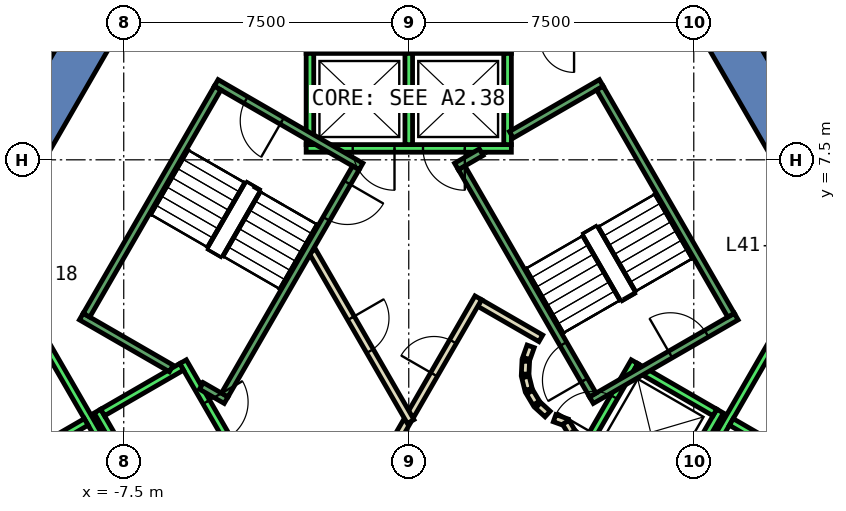
"""IFC4 building model, lengths in metres.
Left out: names, types, materials, properties, quantities, classifications, styles, units other than length and angle.
Written with IfcOpenShell. Run it as: python <this file> out.ifc"""

import sys

from ifc_helpers import new_model, si_unit, direction, frame, frame_2d, origin, place, context, subcontext, project, spatial, polyline, rectangle, outline, extrude, element, fill, save


model = new_model("IFC4")
c1 = context("Model", 3, precision=1e-05, world=origin(), true_north=direction((0.0, 1.0)))
c2 = subcontext(c1, "Body", "Model", "MODEL_VIEW")
j1 = project(units=[si_unit("LENGTHUNIT", "METRE"), si_unit("PLANEANGLEUNIT", "RADIAN")], contexts=[c1])
p1 = place(None, origin())
s1 = spatial("IfcSite", under=j1, at=p1, CompositionType="ELEMENT")
p2 = place(p1, origin())
s2 = spatial("IfcBuilding", under=s1, at=p2, CompositionType="ELEMENT")
p3 = place(p2, frame((0.0, 0.0, 184.4)))
s3 = spatial("IfcBuildingStorey", under=s2, at=p3, CompositionType="ELEMENT", Elevation=184.4)
p4 = place(p3, frame((0.0, 0.0, -0.6)))
e1 = element("IfcWall", 1, at=p4, inside=s3, PredefinedType="SHEAR", context=c2, shape_type="SweptSolid", body=[
    extrude(outline(polyline([(8.517, 11.747), (7.478, 11.147), (12.471, 2.5), (13.856, 2.5), (8.517, 11.747)])), origin(), (0.0, 0.0, 1.0), 5.4),
])
p5 = place(p3, frame((0.0, 0.0, -0.6)))
e2 = element("IfcWall", 2, at=p5, inside=s3, PredefinedType="SHEAR", context=c2, shape_type="SweptSolid", body=[
    extrude(outline(polyline([(-12.267, 5.252), (-11.228, 4.652), (-6.235, 13.3), (-6.928, 14.5), (-12.267, 5.252)])), origin(), (0.0, 0.0, 1.0), 5.4),
])
p6 = place(p3, frame((0.0, 0.0, -0.6)))
e3 = element("IfcWall", 3, at=p6, inside=s3, PredefinedType="SHEAR", context=c2, shape_type="SweptSolid", body=[
    extrude(outline(polyline([(6.928, -9.5), (13.856, 2.5), (12.471, 2.5), (6.235, -8.3), (6.928, -9.5)])), origin(), (0.0, 0.0, 1.0), 5.4),
])
p7 = place(p3, frame((-0.982, -1.0, 0.0), z_axis=(0.0, 0.0, 1.0), x_axis=(0.50024047865, 0.865886518847, 0.0)))
e4 = element("IfcWall", 4, at=p7, inside=s3, PredefinedType="PARTITIONING", context=c2, shape_type="SweptSolid", body=[
    extrude(rectangle(XDim=1.863, YDim=0.2, at=frame_2d((0.931, 0.0))), origin(), (0.0, 0.0, 1.0), 4.8),
])
p8 = place(p3, frame((1.866, 3.732, 0.0), z_axis=(0.0, 0.0, 1.0), x_axis=(0.866043361281, -0.499968895414, 0.0)))
e5 = element("IfcWall", 5, at=p8, inside=s3, PredefinedType="PARTITIONING", context=c2, shape_type="SweptSolid", body=[
    extrude(rectangle(XDim=1.858, YDim=0.2, at=frame_2d((0.929, 0.0))), origin(), (0.0, 0.0, 1.0), 4.8),
])
p9 = place(p3, frame((3.208, 2.592, 0.0), z_axis=(0.0, 0.0, 1.0), x_axis=(-0.337388820924, -0.941365382578, 0.0)))
e6 = element("IfcWall", 6, at=p9, inside=s3, PredefinedType="PARTITIONING", context=c2, shape_type="SweptSolid", body=[
    extrude(rectangle(XDim=0.338, YDim=0.2, at=frame_2d((0.169, 0.0))), origin(), (0.0, 0.0, 1.0), 4.8),
])
p10 = place(p3, frame((3.079, 2.199, 0.0), z_axis=(0.0, 0.0, 1.0), x_axis=(-0.047771483479, -0.998858290933, 0.0)))
e7 = element("IfcWall", 7, at=p10, inside=s3, PredefinedType="PARTITIONING", context=c2, shape_type="SweptSolid", body=[
    extrude(rectangle(XDim=0.337, YDim=0.2, at=frame_2d((0.169, 0.0))), origin(), (0.0, 0.0, 1.0), 4.8),
])
p11 = place(p3, frame((3.07, 1.786, 0.0), z_axis=(0.0, 0.0, 1.0), x_axis=(0.242705583207, -0.970099994784, 0.0)))
e8 = element("IfcWall", 8, at=p11, inside=s3, PredefinedType="PARTITIONING", context=c2, shape_type="SweptSolid", body=[
    extrude(rectangle(XDim=0.338, YDim=0.2, at=frame_2d((0.169, 0.0))), origin(), (0.0, 0.0, 1.0), 4.8),
])
for number, where, z_axis, x_axis in (
    (9, (3.182, 1.388, 0.0), (0.0, 0.0, 1.0), (0.512, -0.859, 0.0)),
    (10, (3.404, 1.039, 0.0), (0.0, 0.0, 1.0), (0.74, -0.672, 0.0)),
):
    element("IfcWall", number, at=place(p3, frame(where, z_axis=z_axis, x_axis=x_axis)), inside=s3, PredefinedType="PARTITIONING", context=c2, shape_type="SweptSolid", body=[
        extrude(rectangle(XDim=0.338, YDim=0.2, at=frame_2d((0.169, 0.0))), origin(), (0.0, 0.0, 1.0), 4.8),
    ])
p12 = place(p3, frame((3.838, 0.702, 0.0), z_axis=(0.0, 0.0, 1.0), x_axis=(0.941035081519, -0.338308993895, 0.0)))
e11 = element("IfcWall", 11, at=p12, inside=s3, PredefinedType="PARTITIONING", context=c2, shape_type="SweptSolid", body=[
    extrude(rectangle(XDim=0.337, YDim=0.2, at=frame_2d((0.168, 0.0))), origin(), (0.0, 0.0, 1.0), 4.8),
])
p13 = place(p3, frame((4.132, 0.593, 0.0), z_axis=(0.0, 0.0, 1.0), x_axis=(0.513561617048, -0.858052717201, 0.0)))
e12 = element("IfcWall", 12, at=p13, inside=s3, PredefinedType="PARTITIONING", context=c2, shape_type="SweptSolid", body=[
    extrude(rectangle(XDim=0.308, YDim=0.2, at=frame_2d((0.154, 0.0))), origin(), (0.0, 0.0, 1.0), 4.8),
])
p14 = place(p3, frame((4.301, 0.315, 0.0), z_axis=(0.0, 0.0, 1.0), x_axis=(0.741798017506, -0.670623367639, 0.0)))
e13 = element("IfcWall", 13, at=p14, inside=s3, PredefinedType="PARTITIONING", context=c2, shape_type="SweptSolid", body=[
    extrude(rectangle(XDim=0.309, YDim=0.2, at=frame_2d((0.154, 0.0))), origin(), (0.0, 0.0, 1.0), 4.8),
])
p15 = place(p3, frame((0.05, 0.787, 0.0), z_axis=(0.0, 0.0, 1.0), x_axis=(0.499954076797, 0.866051915934, 0.0)))
e14 = element("IfcWall", 14, at=p15, inside=s3, PredefinedType="PARTITIONING", context=c2, shape_type="SweptSolid", body=[
    extrude(rectangle(XDim=3.558, YDim=0.2, at=frame_2d((1.779, 0.0))), origin(), (0.0, 0.0, 1.0), 4.8),
])
p16 = place(p15, frame((1.229, 0.0, 0.0)))
e15 = element("IfcOpeningElement", 15, at=p16, cuts=e14, PredefinedType="OPENING", context=c2, shape_type="SweptSolid", body=[
    extrude(rectangle(XDim=1.0, YDim=2.1, at=frame_2d((0.5, 1.05))), frame((0.0, 0.11, 0.0), z_axis=(0.0, -1.0, 0.0), x_axis=(1.0, 0.0, 0.0)), (0.0, 0.0, 1.0), 0.22),
])
p17 = place(p3, frame((-2.54, 5.1, 0.0), z_axis=(0.0, 0.0, 1.0), x_axis=(0.499925051871, -0.866068670783, 0.0)))
e16 = element("IfcWall", 16, at=p17, inside=s3, PredefinedType="PARTITIONING", context=c2, shape_type="SweptSolid", body=[
    extrude(rectangle(XDim=5.181, YDim=0.2, at=frame_2d((2.59, 0.0))), origin(), (0.0, 0.0, 1.0), 4.8),
])
p18 = place(p17, frame((2.04, 0.0, 0.0)))
e17 = element("IfcOpeningElement", 17, at=p18, cuts=e16, PredefinedType="OPENING", context=c2, shape_type="SweptSolid", body=[
    extrude(rectangle(XDim=1.0, YDim=2.1, at=frame_2d((0.5, 1.05))), frame((0.0, 0.11, 0.0), z_axis=(0.0, -1.0, 0.0), x_axis=(1.0, 0.0, 0.0)), (0.0, 0.0, 1.0), 0.22),
])
p19 = place(p3, frame((-13.003, 8.778, 0.0), z_axis=(0.0, 0.0, 1.0), x_axis=(0.499964736285, 0.866045762343, 0.0)))
e18 = element("IfcWall", 18, at=p19, inside=s3, PredefinedType="PARTITIONING", context=c2, shape_type="SweptSolid", body=[
    extrude(rectangle(XDim=9.479, YDim=0.2, at=frame_2d((4.739, 0.0))), origin(), (0.0, 0.0, 1.0), 4.8),
])
p20 = place(p19, frame((7.862, 0.0, 0.0)))
e19 = element("IfcOpeningElement", 19, at=p20, cuts=e18, PredefinedType="OPENING", context=c2, shape_type="SweptSolid", body=[
    extrude(rectangle(XDim=1.0, YDim=2.1, at=frame_2d((0.5, 1.05))), frame((0.0, 0.11, 0.0), z_axis=(0.0, -1.0, 0.0), x_axis=(1.0, 0.0, 0.0)), (0.0, 0.0, 1.0), 0.22),
])
p21 = place(p3, frame((2.7, 7.8, 0.0), z_axis=(0.0, 0.0, 1.0), x_axis=(-1.0, 0.0, 0.0)))
e20 = element("IfcWall", 20, at=p21, inside=s3, PredefinedType="STANDARD", context=c2, shape_type="SweptSolid", body=[
    extrude(rectangle(XDim=5.4, YDim=0.2, at=frame_2d((2.7, 0.0))), origin(), (0.0, 0.0, 1.0), 4.8),
])
p22 = place(p21, frame((1.225, 0.0, 0.0)))
e21 = element("IfcOpeningElement", 21, at=p22, cuts=e20, PredefinedType="OPENING", context=c2, shape_type="SweptSolid", body=[
    extrude(rectangle(XDim=1.1, YDim=2.1, at=frame_2d((0.55, 1.05))), frame((0.0, 0.11, 0.0), z_axis=(0.0, -1.0, 0.0), x_axis=(1.0, 0.0, 0.0)), (0.0, 0.0, 1.0), 0.22),
])
p23 = place(p21, frame((3.075, 0.0, 0.0)))
e22 = element("IfcOpeningElement", 22, at=p23, cuts=e20, PredefinedType="OPENING", context=c2, shape_type="SweptSolid", body=[
    extrude(rectangle(XDim=1.1, YDim=2.1, at=frame_2d((0.55, 1.05))), frame((0.0, 0.11, 0.0), z_axis=(0.0, -1.0, 0.0), x_axis=(1.0, 0.0, 0.0)), (0.0, 0.0, 1.0), 0.22),
])
p24 = place(p3, frame((2.7, 10.4, 0.0), z_axis=(0.0, 0.0, 1.0), x_axis=(-1.0, 0.0, 0.0)))
e23 = element("IfcWall", 23, at=p24, inside=s3, PredefinedType="STANDARD", context=c2, shape_type="SweptSolid", body=[
    extrude(rectangle(XDim=5.4, YDim=0.2, at=frame_2d((2.7, 0.0))), origin(), (0.0, 0.0, 1.0), 4.8),
])
for number, where, z_axis, x_axis in (
    (24, (2.6, 7.9, 0.0), (0.0, 0.0, 1.0), (0.0, 1.0, 0.0)),
    (25, (0.0, 7.9, 0.0), (0.0, 0.0, 1.0), (0.0, 1.0, 0.0)),
    (26, (-2.6, 7.9, 0.0), (0.0, 0.0, 1.0), (0.0, 1.0, 0.0)),
):
    element("IfcWall", number, at=place(p3, frame(where, z_axis=z_axis, x_axis=x_axis)), inside=s3, PredefinedType="STANDARD", context=c2, shape_type="SweptSolid", body=[
        extrude(rectangle(XDim=2.4, YDim=0.2, at=frame_2d((1.2, 0.0))), origin(), (0.0, 0.0, 1.0), 4.8),
    ])
p25 = place(p3, frame((-5.94, 2.188, 0.0), z_axis=(0.0, 0.0, 1.0), x_axis=(0.500034260056, -0.866005622828, 0.0)))
e27 = element("IfcWall", 27, at=p25, inside=s3, PredefinedType="STANDARD", context=c2, shape_type="SweptSolid", body=[
    extrude(rectangle(XDim=5.399, YDim=0.2, at=frame_2d((2.7, 0.0))), origin(), (0.0, 0.0, 1.0), 4.8),
])
p26 = place(p25, frame((3.075, 0.0, 0.0)))
e28 = element("IfcOpeningElement", 28, at=p26, cuts=e27, PredefinedType="OPENING", context=c2, shape_type="SweptSolid", body=[
    extrude(rectangle(XDim=1.1, YDim=2.1, at=frame_2d((0.55, 1.05))), frame((0.0, 0.11, 0.0), z_axis=(0.0, -1.0, 0.0), x_axis=(1.0, 0.0, 0.0)), (0.0, 0.0, 1.0), 0.22),
])
p27 = place(p25, frame((1.225, 0.0, 0.0)))
e29 = element("IfcOpeningElement", 29, at=p27, cuts=e27, PredefinedType="OPENING", context=c2, shape_type="SweptSolid", body=[
    extrude(rectangle(XDim=1.1, YDim=2.1, at=frame_2d((0.55, 1.05))), frame((0.0, 0.11, 0.0), z_axis=(0.0, -1.0, 0.0), x_axis=(1.0, 0.0, 0.0)), (0.0, 0.0, 1.0), 0.22),
])
p28 = place(p3, frame((-8.192, 0.888, 0.0), z_axis=(0.0, 0.0, 1.0), x_axis=(0.500034260056, -0.866005622828, 0.0)))
e30 = element("IfcWall", 30, at=p28, inside=s3, PredefinedType="STANDARD", context=c2, shape_type="SweptSolid", body=[
    extrude(rectangle(XDim=5.399, YDim=0.2, at=frame_2d((2.7, 0.0))), origin(), (0.0, 0.0, 1.0), 4.8),
])
p29 = place(p3, frame((-5.977, 2.052, 0.0), z_axis=(0.0, 0.0, 1.0), x_axis=(-0.865973769406, -0.500089422704, 0.0)))
e31 = element("IfcWall", 31, at=p29, inside=s3, PredefinedType="STANDARD", context=c2, shape_type="SweptSolid", body=[
    extrude(rectangle(XDim=2.399, YDim=0.2, at=frame_2d((1.2, 0.0))), origin(), (0.0, 0.0, 1.0), 4.8),
])
p30 = place(p3, frame((-9.751, 2.99, 0.0), z_axis=(0.0, 0.0, 1.0), x_axis=(0.50000090737, -0.866024879913, 0.0)))
e32 = element("IfcWall", 32, at=p30, inside=s3, PredefinedType="STANDARD", context=c2, shape_type="SweptSolid", body=[
    extrude(rectangle(XDim=10.6, YDim=0.2, at=frame_2d((5.3, 0.0))), origin(), (0.0, 0.0, 1.0), 4.8),
])
p31 = place(p3, frame((-8.488, 0.602, 0.0), z_axis=(0.0, 0.0, 1.0), x_axis=(-0.866022959057, -0.500004234368, 0.0)))
e33 = element("IfcWall", 33, at=p31, inside=s3, PredefinedType="STANDARD", context=c2, shape_type="SweptSolid", body=[
    extrude(rectangle(XDim=2.5, YDim=0.2, at=frame_2d((1.25, 0.0))), origin(), (0.0, 0.0, 1.0), 4.8),
])
p32 = place(p3, frame((3.24, -2.488, 0.0), z_axis=(0.0, 0.0, 1.0), x_axis=(0.500034260056, 0.866005622828, 0.0)))
e34 = element("IfcWall", 34, at=p32, inside=s3, PredefinedType="STANDARD", context=c2, shape_type="SweptSolid", body=[
    extrude(rectangle(XDim=5.399, YDim=0.2, at=frame_2d((2.7, 0.0))), origin(), (0.0, 0.0, 1.0), 4.8),
])
p33 = place(p32, frame((3.225, 0.0, 0.0)))
e35 = element("IfcOpeningElement", 35, at=p33, cuts=e34, PredefinedType="OPENING", context=c2, shape_type="SweptSolid", body=[
    extrude(rectangle(XDim=1.1, YDim=2.1, at=frame_2d((0.55, 1.05))), frame((0.0, 0.11, 0.0), z_axis=(0.0, -1.0, 0.0), x_axis=(1.0, 0.0, 0.0)), (0.0, 0.0, 1.0), 0.22),
])
p34 = place(p32, frame((1.225, 0.0, 0.0)))
e36 = element("IfcOpeningElement", 36, at=p34, cuts=e34, PredefinedType="OPENING", context=c2, shape_type="SweptSolid", body=[
    extrude(rectangle(XDim=1.1, YDim=2.1, at=frame_2d((0.55, 1.05))), frame((0.0, 0.11, 0.0), z_axis=(0.0, -1.0, 0.0), x_axis=(1.0, 0.0, 0.0)), (0.0, 0.0, 1.0), 0.22),
])
p35 = place(p3, frame((5.492, -3.788, 0.0), z_axis=(0.0, 0.0, 1.0), x_axis=(0.500034260056, 0.866005622828, 0.0)))
e37 = element("IfcWall", 37, at=p35, inside=s3, PredefinedType="STANDARD", context=c2, shape_type="SweptSolid", body=[
    extrude(rectangle(XDim=5.399, YDim=0.2, at=frame_2d((2.7, 0.0))), origin(), (0.0, 0.0, 1.0), 4.8),
])
p36 = place(p3, frame((5.977, 2.052, 0.0), z_axis=(0.0, 0.0, 1.0), x_axis=(0.865973769406, -0.500089422704, 0.0)))
e38 = element("IfcWall", 38, at=p36, inside=s3, PredefinedType="STANDARD", context=c2, shape_type="SweptSolid", body=[
    extrude(rectangle(XDim=2.399, YDim=0.2, at=frame_2d((1.2, 0.0))), origin(), (0.0, 0.0, 1.0), 4.8),
])
p37 = place(p3, frame((4.451, -6.19, 0.0), z_axis=(0.0, 0.0, 1.0), x_axis=(0.50000090737, 0.866024879913, 0.0)))
e39 = element("IfcWall", 39, at=p37, inside=s3, PredefinedType="STANDARD", context=c2, shape_type="SweptSolid", body=[
    extrude(rectangle(XDim=10.6, YDim=0.2, at=frame_2d((5.3, 0.0))), origin(), (0.0, 0.0, 1.0), 4.8),
])
p38 = place(p3, frame((8.488, 0.602, 0.0), z_axis=(0.0, 0.0, 1.0), x_axis=(0.866022959057, -0.500004234368, 0.0)))
e40 = element("IfcWall", 40, at=p38, inside=s3, PredefinedType="STANDARD", context=c2, shape_type="SweptSolid", body=[
    extrude(rectangle(XDim=2.5, YDim=0.2, at=frame_2d((1.25, 0.0))), origin(), (0.0, 0.0, 1.0), 4.8),
])
p39 = place(p3, frame((4.806, 1.176, 0.0), z_axis=(0.0, 0.0, 1.0), x_axis=(0.866059941101, 0.499940174841, 0.0)))
e41 = element("IfcWall", 41, at=p39, inside=s3, PredefinedType="STANDARD", context=c2, shape_type="SweptSolid", body=[
    extrude(rectangle(XDim=4.4, YDim=0.2, at=frame_2d((2.2, 0.0))), origin(), (0.0, 0.0, 1.0), 4.8),
])
p40 = place(p39, frame((2.4, 0.0, 0.0)))
e42 = element("IfcOpeningElement", 42, at=p40, cuts=e41, PredefinedType="OPENING", context=c2, shape_type="SweptSolid", body=[
    extrude(rectangle(XDim=1.1, YDim=2.2, at=frame_2d((0.55, 1.1))), frame((0.0, 0.11, 0.0), z_axis=(0.0, -1.0, 0.0), x_axis=(1.0, 0.0, 0.0)), (0.0, 0.0, 1.0), 0.22),
])
p41 = place(p3, frame((2.7, 8.158, 0.0), z_axis=(0.0, 0.0, 1.0), x_axis=(0.86611865017, 0.499838457731, 0.0)))
e43 = element("IfcWall", 43, at=p41, inside=s3, PredefinedType="STANDARD", context=c2, shape_type="SweptSolid", body=[
    extrude(rectangle(XDim=2.733, YDim=0.2, at=frame_2d((1.366, 0.0))), origin(), (0.0, 0.0, 1.0), 4.8),
])
p42 = place(p3, frame((1.256, 7.324, 0.0), z_axis=(0.0, 0.0, 1.0), x_axis=(0.865915093549, 0.500191014278, 0.0)))
e44 = element("IfcWall", 44, at=p42, inside=s3, PredefinedType="STANDARD", context=c2, shape_type="SweptSolid", body=[
    extrude(rectangle(XDim=0.752, YDim=0.2, at=frame_2d((0.376, 0.0))), origin(), (0.0, 0.0, 1.0), 4.8),
])
p43 = place(p3, frame((4.843, 1.312, 0.0), z_axis=(0.0, 0.0, 1.0), x_axis=(-0.499963383562, 0.866046543262, 0.0)))
e45 = element("IfcWall", 45, at=p43, inside=s3, PredefinedType="STANDARD", context=c2, shape_type="SweptSolid", body=[
    extrude(rectangle(XDim=6.9, YDim=0.2, at=frame_2d((3.45, 0.0))), origin(), (0.0, 0.0, 1.0), 4.8),
])
p44 = place(p43, frame((0.45, 0.0, 0.0)))
e46 = element("IfcOpeningElement", 46, at=p44, cuts=e45, PredefinedType="OPENING", context=c2, shape_type="SweptSolid", body=[
    extrude(rectangle(XDim=1.1, YDim=2.2, at=frame_2d((0.55, 1.1))), frame((0.0, 0.11, 0.0), z_axis=(0.0, -1.0, 0.0), x_axis=(1.0, 0.0, 0.0)), (0.0, 0.0, 1.0), 0.22),
])
p45 = place(p3, frame((8.48, 3.412, 0.0), z_axis=(0.0, 0.0, 1.0), x_axis=(-0.499978703459, 0.866037698999, 0.0)))
e47 = element("IfcWall", 47, at=p45, inside=s3, PredefinedType="STANDARD", context=c2, shape_type="SweptSolid", body=[
    extrude(rectangle(XDim=6.9, YDim=0.2, at=frame_2d((3.45, 0.0))), origin(), (0.0, 0.0, 1.0), 4.8),
])
p46 = place(p3, frame((-1.256, 7.324, 0.0), z_axis=(0.0, 0.0, 1.0), x_axis=(-0.866046073146, 0.499964197906, 0.0)))
e48 = element("IfcWall", 48, at=p46, inside=s3, PredefinedType="STANDARD", context=c2, shape_type="SweptSolid", body=[
    extrude(rectangle(XDim=4.4, YDim=0.2, at=frame_2d((2.2, 0.0))), origin(), (0.0, 0.0, 1.0), 4.8),
])
p47 = place(p46, frame((2.4, 0.0, 0.0)))
e49 = element("IfcOpeningElement", 49, at=p47, cuts=e48, PredefinedType="OPENING", context=c2, shape_type="SweptSolid", body=[
    extrude(rectangle(XDim=1.1, YDim=2.2, at=frame_2d((0.55, 1.1))), frame((0.0, 0.11, 0.0), z_axis=(0.0, -1.0, 0.0), x_axis=(1.0, 0.0, 0.0)), (0.0, 0.0, 1.0), 0.22),
])
p48 = place(p3, frame((-6.25, 2.01, 0.0), z_axis=(0.0, 0.0, 1.0), x_axis=(-0.86611865017, 0.499838457731, 0.0)))
e50 = element("IfcWall", 50, at=p48, inside=s3, PredefinedType="STANDARD", context=c2, shape_type="SweptSolid", body=[
    extrude(rectangle(XDim=2.733, YDim=0.2, at=frame_2d((1.366, 0.0))), origin(), (0.0, 0.0, 1.0), 4.8),
])
p49 = place(p3, frame((-4.806, 1.176, 0.0), z_axis=(0.0, 0.0, 1.0), x_axis=(-0.866558586415, 0.499075361355, 0.0)))
e51 = element("IfcWall", 51, at=p49, inside=s3, PredefinedType="STANDARD", context=c2, shape_type="SweptSolid", body=[
    extrude(rectangle(XDim=0.751, YDim=0.2, at=frame_2d((0.376, 0.0))), origin(), (0.0, 0.0, 1.0), 4.8),
])
p50 = place(p3, frame((-1.393, 7.288, 0.0), z_axis=(0.0, 0.0, 1.0), x_axis=(-0.499963383562, -0.866046543262, 0.0)))
e52 = element("IfcWall", 52, at=p50, inside=s3, PredefinedType="STANDARD", context=c2, shape_type="SweptSolid", body=[
    extrude(rectangle(XDim=6.9, YDim=0.2, at=frame_2d((3.45, 0.0))), origin(), (0.0, 0.0, 1.0), 4.8),
])
p51 = place(p50, frame((0.45, 0.0, 0.0)))
e53 = element("IfcOpeningElement", 53, at=p51, cuts=e52, PredefinedType="OPENING", context=c2, shape_type="SweptSolid", body=[
    extrude(rectangle(XDim=1.1, YDim=2.2, at=frame_2d((0.55, 1.1))), frame((0.0, 0.11, 0.0), z_axis=(0.0, -1.0, 0.0), x_axis=(1.0, 0.0, 0.0)), (0.0, 0.0, 1.0), 0.22),
])
p52 = place(p3, frame((-5.03, 9.388, 0.0), z_axis=(0.0, 0.0, 1.0), x_axis=(-0.499978703459, -0.866037698999, 0.0)))
e54 = element("IfcWall", 54, at=p52, inside=s3, PredefinedType="STANDARD", context=c2, shape_type="SweptSolid", body=[
    extrude(rectangle(XDim=6.9, YDim=0.2, at=frame_2d((3.45, 0.0))), origin(), (0.0, 0.0, 1.0), 4.8),
])
p53 = place(p16, origin())
e55 = element("IfcDoor", 55, at=p53, inside=s3, OperationType="SINGLE_SWING_RIGHT", PredefinedType="DOOR", context=c2, shape_type="SweptSolid", body=[
    extrude(rectangle(XDim=1.0, YDim=2.1, at=frame_2d((0.5, 1.05))), frame((0.0, 0.025, 0.0), z_axis=(0.0, -1.0, 0.0), x_axis=(1.0, 0.0, 0.0)), (0.0, 0.0, 1.0), 0.05),
])
fill(e15, e55)
p54 = place(p18, origin())
e56 = element("IfcDoor", 56, at=p54, inside=s3, OperationType="SINGLE_SWING_RIGHT", PredefinedType="DOOR", context=c2, shape_type="SweptSolid", body=[
    extrude(rectangle(XDim=1.0, YDim=2.1, at=frame_2d((0.5, 1.05))), frame((0.0, 0.025, 0.0), z_axis=(0.0, -1.0, 0.0), x_axis=(1.0, 0.0, 0.0)), (0.0, 0.0, 1.0), 0.05),
])
fill(e17, e56)
p55 = place(p22, origin())
e57 = element("IfcDoor", 57, at=p55, inside=s3, OperationType="SLIDING_TO_LEFT", PredefinedType="DOOR", context=c2, shape_type="SweptSolid", body=[
    extrude(rectangle(XDim=1.1, YDim=2.1, at=frame_2d((0.55, 1.05))), frame((0.0, 0.025, 0.0), z_axis=(0.0, -1.0, 0.0), x_axis=(1.0, 0.0, 0.0)), (0.0, 0.0, 1.0), 0.05),
])
fill(e21, e57)
p56 = place(p23, origin())
e58 = element("IfcDoor", 58, at=p56, inside=s3, OperationType="SLIDING_TO_LEFT", PredefinedType="DOOR", context=c2, shape_type="SweptSolid", body=[
    extrude(rectangle(XDim=1.1, YDim=2.1, at=frame_2d((0.55, 1.05))), frame((0.0, 0.025, 0.0), z_axis=(0.0, -1.0, 0.0), x_axis=(1.0, 0.0, 0.0)), (0.0, 0.0, 1.0), 0.05),
])
fill(e22, e58)
p57 = place(p33, origin())
e59 = element("IfcDoor", 59, at=p57, inside=s3, OperationType="SLIDING_TO_LEFT", PredefinedType="DOOR", context=c2, shape_type="SweptSolid", body=[
    extrude(rectangle(XDim=1.1, YDim=2.1, at=frame_2d((0.55, 1.05))), frame((0.0, 0.025, 0.0), z_axis=(0.0, -1.0, 0.0), x_axis=(1.0, 0.0, 0.0)), (0.0, 0.0, 1.0), 0.05),
])
fill(e35, e59)
p58 = place(p27, origin())
e60 = element("IfcDoor", 60, at=p58, inside=s3, OperationType="SLIDING_TO_LEFT", PredefinedType="DOOR", context=c2, shape_type="SweptSolid", body=[
    extrude(rectangle(XDim=1.1, YDim=2.1, at=frame_2d((0.55, 1.05))), frame((0.0, 0.025, 0.0), z_axis=(0.0, -1.0, 0.0), x_axis=(1.0, 0.0, 0.0)), (0.0, 0.0, 1.0), 0.05),
])
fill(e29, e60)
p59 = place(p44, origin())
e61 = element("IfcDoor", 61, at=p59, inside=s3, OperationType="SINGLE_SWING_LEFT", PredefinedType="DOOR", context=c2, shape_type="SweptSolid", body=[
    extrude(rectangle(XDim=1.1, YDim=2.2, at=frame_2d((0.55, 1.1))), frame((0.0, 0.025, 0.0), z_axis=(0.0, -1.0, 0.0), x_axis=(1.0, 0.0, 0.0)), (0.0, 0.0, 1.0), 0.05),
])
fill(e46, e61)
p60 = place(p40, origin())
e62 = element("IfcDoor", 62, at=p60, inside=s3, OperationType="SINGLE_SWING_LEFT", PredefinedType="DOOR", context=c2, shape_type="SweptSolid", body=[
    extrude(rectangle(XDim=1.1, YDim=2.2, at=frame_2d((0.55, 1.1))), frame((0.0, 0.025, 0.0), z_axis=(0.0, -1.0, 0.0), x_axis=(1.0, 0.0, 0.0)), (0.0, 0.0, 1.0), 0.05),
])
fill(e42, e62)
p61 = place(p51, origin())
e63 = element("IfcDoor", 63, at=p61, inside=s3, OperationType="SINGLE_SWING_LEFT", PredefinedType="DOOR", context=c2, shape_type="SweptSolid", body=[
    extrude(rectangle(XDim=1.1, YDim=2.2, at=frame_2d((0.55, 1.1))), frame((0.0, 0.025, 0.0), z_axis=(0.0, -1.0, 0.0), x_axis=(1.0, 0.0, 0.0)), (0.0, 0.0, 1.0), 0.05),
])
fill(e53, e63)
p62 = place(p47, origin())
e64 = element("IfcDoor", 64, at=p62, inside=s3, OperationType="SINGLE_SWING_LEFT", PredefinedType="DOOR", context=c2, shape_type="SweptSolid", body=[
    extrude(rectangle(XDim=1.1, YDim=2.2, at=frame_2d((0.55, 1.1))), frame((0.0, 0.025, 0.0), z_axis=(0.0, -1.0, 0.0), x_axis=(1.0, 0.0, 0.0)), (0.0, 0.0, 1.0), 0.05),
])
fill(e49, e64)
save(model, sys.argv[1])
